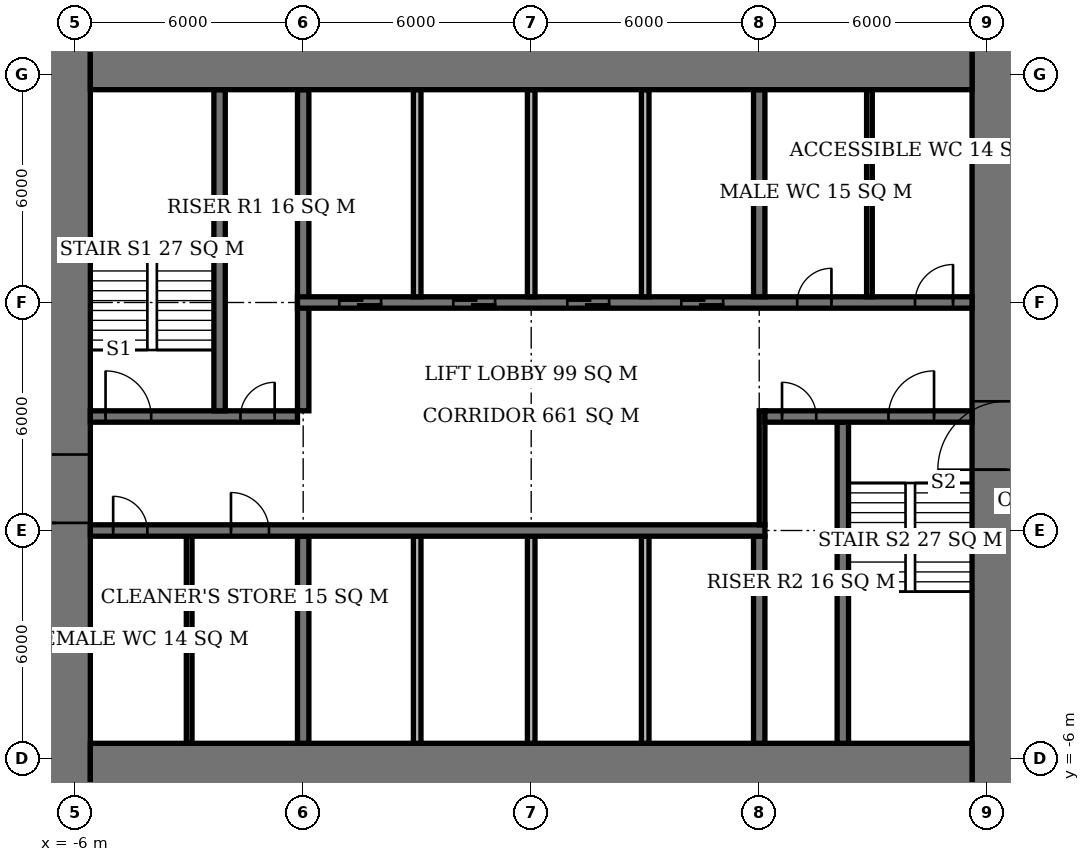
"""IFC4 building model, lengths in metres.
Left out: names, types, materials, properties, quantities, classifications, styles, units other than length and angle.
Written with IfcOpenShell. Run it as: python <this file> out.ifc"""

import sys

from ifc_helpers import new_model, si_unit, direction, frame, frame_2d, origin, place, context, subcontext, project, spatial, rectangle, extrude, element, fill, save


model = new_model("IFC4")
c1 = context("Model", 3, precision=1e-05, world=origin(), true_north=direction((0.0, 1.0)))
c2 = subcontext(c1, "Body", "Model", "MODEL_VIEW")
j1 = project(units=[si_unit("LENGTHUNIT", "METRE"), si_unit("PLANEANGLEUNIT", "RADIAN")], contexts=[c1])
p1 = place(None, origin())
s1 = spatial("IfcSite", under=j1, at=p1, CompositionType="ELEMENT")
p2 = place(p1, origin())
s2 = spatial("IfcBuilding", under=s1, at=p2, CompositionType="ELEMENT")
p3 = place(p2, frame((0.0, 0.0, 84.5)))
s3 = spatial("IfcBuildingStorey", under=s2, at=p3, CompositionType="ELEMENT", Elevation=84.5)
for number, where, z_axis, x_axis in (
    (1, (-5.6, -6.6, 0.0), (0.0, 0.0, 1.0), (1.0, 0.0, 0.0)),
    (2, (-5.6, 12.6, 0.0), (0.0, 0.0, 1.0), (1.0, 0.0, 0.0)),
):
    element("IfcWall", number, at=place(p3, frame(where, z_axis=z_axis, x_axis=x_axis)), inside=s3, PredefinedType="SHEAR", context=c2, shape_type="SweptSolid", body=[
        extrude(rectangle(XDim=23.2, YDim=2.0, at=frame_2d((11.6, 0.0))), origin(), (0.0, 0.0, 1.0), 3.9),
    ])
p4 = place(p3, frame((-6.5, -7.6, 0.0), z_axis=(0.0, 0.0, 1.0), x_axis=(0.0, 1.0, 0.0)))
e3 = element("IfcWall", 3, at=p4, inside=s3, PredefinedType="SHEAR", context=c2, shape_type="SweptSolid", body=[
    extrude(rectangle(XDim=21.2, YDim=1.8, at=frame_2d((10.6, 0.0))), origin(), (0.0, 0.0, 1.0), 3.9),
])
p5 = place(p4, frame((7.8, 0.0, 0.0)))
e4 = element("IfcOpeningElement", 4, at=p5, cuts=e3, PredefinedType="OPENING", context=c2, shape_type="SweptSolid", body=[
    extrude(rectangle(XDim=1.8, YDim=2.4, at=frame_2d((0.9, 1.2))), frame((0.0, 0.91, 0.0), z_axis=(0.0, -1.0, 0.0), x_axis=(1.0, 0.0, 0.0)), (0.0, 0.0, 1.0), 1.82),
])
p6 = place(p3, frame((18.5, -7.6, 0.0), z_axis=(0.0, 0.0, 1.0), x_axis=(0.0, 1.0, 0.0)))
e5 = element("IfcWall", 5, at=p6, inside=s3, PredefinedType="SHEAR", context=c2, shape_type="SweptSolid", body=[
    extrude(rectangle(XDim=21.2, YDim=1.8, at=frame_2d((10.6, 0.0))), origin(), (0.0, 0.0, 1.0), 3.9),
])
p7 = place(p6, frame((9.2, 0.0, 0.0)))
e6 = element("IfcOpeningElement", 6, at=p7, cuts=e5, PredefinedType="OPENING", context=c2, shape_type="SweptSolid", body=[
    extrude(rectangle(XDim=1.8, YDim=2.4, at=frame_2d((0.9, 1.2))), frame((0.0, 0.91, 0.0), z_axis=(0.0, -1.0, 0.0), x_axis=(1.0, 0.0, 0.0)), (0.0, 0.0, 1.0), 1.82),
])
p8 = place(p3, frame((-5.6, 0.0, 0.0), z_axis=(0.0, 0.0, 1.0), x_axis=(1.0, 0.0, 0.0)))
e7 = element("IfcWall", 7, at=p8, inside=s3, PredefinedType="SHEAR", context=c2, shape_type="SweptSolid", body=[
    extrude(rectangle(XDim=17.75, YDim=0.3, at=frame_2d((8.875, 0.0))), origin(), (0.0, 0.0, 1.0), 3.9),
])
p9 = place(p8, frame((0.6, 0.0, 0.0)))
e8 = element("IfcOpeningElement", 8, at=p9, cuts=e7, PredefinedType="OPENING", context=c2, shape_type="SweptSolid", body=[
    extrude(rectangle(XDim=0.9, YDim=2.1, at=frame_2d((0.45, 1.05))), frame((0.0, 0.16, 0.0), z_axis=(0.0, -1.0, 0.0), x_axis=(1.0, 0.0, 0.0)), (0.0, 0.0, 1.0), 0.32),
])
p10 = place(p8, frame((3.7, 0.0, 0.0)))
e9 = element("IfcOpeningElement", 9, at=p10, cuts=e7, PredefinedType="OPENING", context=c2, shape_type="SweptSolid", body=[
    extrude(rectangle(XDim=1.0, YDim=2.1, at=frame_2d((0.5, 1.05))), frame((0.0, 0.16, 0.0), z_axis=(0.0, -1.0, 0.0), x_axis=(1.0, 0.0, 0.0)), (0.0, 0.0, 1.0), 0.32),
])
p11 = place(p3, frame((-5.6, 3.0, 0.0), z_axis=(0.0, 0.0, 1.0), x_axis=(1.0, 0.0, 0.0)))
e10 = element("IfcWall", 10, at=p11, inside=s3, PredefinedType="SHEAR", context=c2, shape_type="SweptSolid", body=[
    extrude(rectangle(XDim=5.45, YDim=0.3, at=frame_2d((2.725, 0.0))), origin(), (0.0, 0.0, 1.0), 3.9),
])
p12 = place(p11, frame((0.4, 0.0, 0.0)))
e11 = element("IfcOpeningElement", 11, at=p12, cuts=e10, PredefinedType="OPENING", context=c2, shape_type="SweptSolid", body=[
    extrude(rectangle(XDim=1.2, YDim=2.1, at=frame_2d((0.6, 1.05))), frame((0.0, 0.16, 0.0), z_axis=(0.0, -1.0, 0.0), x_axis=(1.0, 0.0, 0.0)), (0.0, 0.0, 1.0), 0.32),
])
p13 = place(p11, frame((3.95, 0.0, 0.0)))
e12 = element("IfcOpeningElement", 12, at=p13, cuts=e10, PredefinedType="OPENING", context=c2, shape_type="SweptSolid", body=[
    extrude(rectangle(XDim=0.9, YDim=2.1, at=frame_2d((0.45, 1.05))), frame((0.0, 0.16, 0.0), z_axis=(0.0, -1.0, 0.0), x_axis=(1.0, 0.0, 0.0)), (0.0, 0.0, 1.0), 0.32),
])
p14 = place(p3, frame((12.15, 3.0, 0.0), z_axis=(0.0, 0.0, 1.0), x_axis=(1.0, 0.0, 0.0)))
e13 = element("IfcWall", 13, at=p14, inside=s3, PredefinedType="SHEAR", context=c2, shape_type="SweptSolid", body=[
    extrude(rectangle(XDim=5.45, YDim=0.3, at=frame_2d((2.725, 0.0))), origin(), (0.0, 0.0, 1.0), 3.9),
])
p15 = place(p14, frame((3.25, 0.0, 0.0)))
e14 = element("IfcOpeningElement", 14, at=p15, cuts=e13, PredefinedType="OPENING", context=c2, shape_type="SweptSolid", body=[
    extrude(rectangle(XDim=1.2, YDim=2.1, at=frame_2d((0.6, 1.05))), frame((0.0, 0.16, 0.0), z_axis=(0.0, -1.0, 0.0), x_axis=(1.0, 0.0, 0.0)), (0.0, 0.0, 1.0), 0.32),
])
p16 = place(p14, frame((0.45, 0.0, 0.0)))
e15 = element("IfcOpeningElement", 15, at=p16, cuts=e13, PredefinedType="OPENING", context=c2, shape_type="SweptSolid", body=[
    extrude(rectangle(XDim=0.9, YDim=2.1, at=frame_2d((0.45, 1.05))), frame((0.0, 0.16, 0.0), z_axis=(0.0, -1.0, 0.0), x_axis=(1.0, 0.0, 0.0)), (0.0, 0.0, 1.0), 0.32),
])
p17 = place(p3, frame((-0.15, 6.0, 0.0), z_axis=(0.0, 0.0, 1.0), x_axis=(1.0, 0.0, 0.0)))
e16 = element("IfcWall", 16, at=p17, inside=s3, PredefinedType="SHEAR", context=c2, shape_type="SweptSolid", body=[
    extrude(rectangle(XDim=17.75, YDim=0.3, at=frame_2d((8.875, 0.0))), origin(), (0.0, 0.0, 1.0), 3.9),
])
p18 = place(p17, frame((13.15, 0.0, 0.0)))
e17 = element("IfcOpeningElement", 17, at=p18, cuts=e16, PredefinedType="OPENING", context=c2, shape_type="SweptSolid", body=[
    extrude(rectangle(XDim=0.9, YDim=2.1, at=frame_2d((0.45, 1.05))), frame((0.0, 0.16, 0.0), z_axis=(0.0, -1.0, 0.0), x_axis=(1.0, 0.0, 0.0)), (0.0, 0.0, 1.0), 0.32),
])
p19 = place(p17, frame((16.25, 0.0, 0.0)))
e18 = element("IfcOpeningElement", 18, at=p19, cuts=e16, PredefinedType="OPENING", context=c2, shape_type="SweptSolid", body=[
    extrude(rectangle(XDim=1.0, YDim=2.1, at=frame_2d((0.5, 1.05))), frame((0.0, 0.16, 0.0), z_axis=(0.0, -1.0, 0.0), x_axis=(1.0, 0.0, 0.0)), (0.0, 0.0, 1.0), 0.32),
])
p20 = place(p17, frame((1.1, 0.0, 0.0)))
e19 = element("IfcOpeningElement", 19, at=p20, cuts=e16, PredefinedType="OPENING", context=c2, shape_type="SweptSolid", body=[
    extrude(rectangle(XDim=1.1, YDim=2.1, at=frame_2d((0.55, 1.05))), frame((0.0, 0.16, 0.0), z_axis=(0.0, -1.0, 0.0), x_axis=(1.0, 0.0, 0.0)), (0.0, 0.0, 1.0), 0.32),
])
p21 = place(p17, frame((4.1, 0.0, 0.0)))
e20 = element("IfcOpeningElement", 20, at=p21, cuts=e16, PredefinedType="OPENING", context=c2, shape_type="SweptSolid", body=[
    extrude(rectangle(XDim=1.1, YDim=2.1, at=frame_2d((0.55, 1.05))), frame((0.0, 0.16, 0.0), z_axis=(0.0, -1.0, 0.0), x_axis=(1.0, 0.0, 0.0)), (0.0, 0.0, 1.0), 0.32),
])
p22 = place(p17, frame((7.1, 0.0, 0.0)))
e21 = element("IfcOpeningElement", 21, at=p22, cuts=e16, PredefinedType="OPENING", context=c2, shape_type="SweptSolid", body=[
    extrude(rectangle(XDim=1.1, YDim=2.1, at=frame_2d((0.55, 1.05))), frame((0.0, 0.16, 0.0), z_axis=(0.0, -1.0, 0.0), x_axis=(1.0, 0.0, 0.0)), (0.0, 0.0, 1.0), 0.32),
])
p23 = place(p17, frame((10.1, 0.0, 0.0)))
e22 = element("IfcOpeningElement", 22, at=p23, cuts=e16, PredefinedType="OPENING", context=c2, shape_type="SweptSolid", body=[
    extrude(rectangle(XDim=1.1, YDim=2.1, at=frame_2d((0.55, 1.05))), frame((0.0, 0.16, 0.0), z_axis=(0.0, -1.0, 0.0), x_axis=(1.0, 0.0, 0.0)), (0.0, 0.0, 1.0), 0.32),
])
p24 = place(p3, frame((0.0, -5.6, 0.0), z_axis=(0.0, 0.0, 1.0), x_axis=(0.0, 1.0, 0.0)))
e23 = element("IfcWall", 23, at=p24, inside=s3, PredefinedType="SHEAR", context=c2, shape_type="SweptSolid", body=[
    extrude(rectangle(XDim=5.45, YDim=0.3, at=frame_2d((2.725, 0.0))), origin(), (0.0, 0.0, 1.0), 3.9),
])
p25 = place(p3, frame((0.0, 3.15, 0.0), z_axis=(0.0, 0.0, 1.0), x_axis=(0.0, 1.0, 0.0)))
e24 = element("IfcWall", 24, at=p25, inside=s3, PredefinedType="SHEAR", context=c2, shape_type="SweptSolid", body=[
    extrude(rectangle(XDim=8.45, YDim=0.3, at=frame_2d((4.225, 0.0))), origin(), (0.0, 0.0, 1.0), 3.9),
])
for number, where, z_axis, x_axis in (
    (25, (12.0, -5.6, 0.0), (0.0, 0.0, 1.0), (0.0, 1.0, 0.0)),
    (26, (12.0, 6.15, 0.0), (0.0, 0.0, 1.0), (0.0, 1.0, 0.0)),
):
    element("IfcWall", number, at=place(p3, frame(where, z_axis=z_axis, x_axis=x_axis)), inside=s3, PredefinedType="SHEAR", context=c2, shape_type="SweptSolid", body=[
        extrude(rectangle(XDim=5.45, YDim=0.3, at=frame_2d((2.725, 0.0))), origin(), (0.0, 0.0, 1.0), 3.9),
    ])
for number, where, z_axis, x_axis in (
    (27, (-2.2, 3.15, 0.0), (0.0, 0.0, 1.0), (0.0, 1.0, 0.0)),
    (28, (14.2, -5.6, 0.0), (0.0, 0.0, 1.0), (0.0, 1.0, 0.0)),
):
    element("IfcWall", number, at=place(p3, frame(where, z_axis=z_axis, x_axis=x_axis)), inside=s3, PredefinedType="SHEAR", context=c2, shape_type="SweptSolid", body=[
        extrude(rectangle(XDim=8.45, YDim=0.3, at=frame_2d((4.225, 0.0))), origin(), (0.0, 0.0, 1.0), 3.9),
    ])
for number, where, z_axis, x_axis in (
    (29, (3.0, 6.15, 0.0), (0.0, 0.0, 1.0), (0.0, 1.0, 0.0)),
    (30, (6.0, 6.15, 0.0), (0.0, 0.0, 1.0), (0.0, 1.0, 0.0)),
    (31, (9.0, 6.15, 0.0), (0.0, 0.0, 1.0), (0.0, 1.0, 0.0)),
    (32, (3.0, -5.6, 0.0), (0.0, 0.0, 1.0), (0.0, 1.0, 0.0)),
    (33, (6.0, -5.6, 0.0), (0.0, 0.0, 1.0), (0.0, 1.0, 0.0)),
    (34, (9.0, -5.6, 0.0), (0.0, 0.0, 1.0), (0.0, 1.0, 0.0)),
):
    element("IfcWall", number, at=place(p3, frame(where, z_axis=z_axis, x_axis=x_axis)), inside=s3, PredefinedType="SOLIDWALL", context=c2, shape_type="SweptSolid", body=[
        extrude(rectangle(XDim=5.45, YDim=0.2, at=frame_2d((2.725, 0.0))), origin(), (0.0, 0.0, 1.0), 3.9),
    ])
for number, where, z_axis, x_axis in (
    (35, (-3.0, -5.6, 0.0), (0.0, 0.0, 1.0), (0.0, 1.0, 0.0)),
    (36, (14.9, 6.15, 0.0), (0.0, 0.0, 1.0), (0.0, 1.0, 0.0)),
):
    element("IfcWall", number, at=place(p3, frame(where, z_axis=z_axis, x_axis=x_axis)), inside=s3, PredefinedType="PLUMBINGWALL", context=c2, shape_type="SweptSolid", body=[
        extrude(rectangle(XDim=5.45, YDim=0.15, at=frame_2d((2.725, 0.0))), origin(), (0.0, 0.0, 1.0), 3.65),
    ])
p26 = place(p3, frame((12.075, 0.15, 0.0), z_axis=(0.0, 0.0, 1.0), x_axis=(0.0, 1.0, 0.0)))
e37 = element("IfcWall", 37, at=p26, inside=s3, PredefinedType="PARTITIONING", context=c2, shape_type="SweptSolid", body=[
    extrude(rectangle(XDim=3.0, YDim=0.15, at=frame_2d((1.5, 0.0))), origin(), (0.0, 0.0, 1.0), 3.65),
])
p27 = place(p5, origin())
e38 = element("IfcDoor", 38, at=p27, inside=s3, OperationType="DOUBLE_DOOR_SINGLE_SWING", PredefinedType="DOOR", context=c2, shape_type="SweptSolid", body=[
    extrude(rectangle(XDim=1.8, YDim=2.4, at=frame_2d((0.9, 1.2))), frame((0.0, 0.025, 0.0), z_axis=(0.0, -1.0, 0.0), x_axis=(1.0, 0.0, 0.0)), (0.0, 0.0, 1.0), 0.05),
])
fill(e4, e38)
p28 = place(p7, origin())
e39 = element("IfcDoor", 39, at=p28, inside=s3, OperationType="DOUBLE_DOOR_SINGLE_SWING", PredefinedType="DOOR", context=c2, shape_type="SweptSolid", body=[
    extrude(rectangle(XDim=1.8, YDim=2.4, at=frame_2d((0.9, 1.2))), frame((0.0, 0.025, 0.0), z_axis=(0.0, -1.0, 0.0), x_axis=(1.0, 0.0, 0.0)), (0.0, 0.0, 1.0), 0.05),
])
fill(e6, e39)
p29 = place(p12, origin())
e40 = element("IfcDoor", 40, at=p29, inside=s3, OperationType="SINGLE_SWING_LEFT", PredefinedType="DOOR", context=c2, shape_type="SweptSolid", body=[
    extrude(rectangle(XDim=1.2, YDim=2.1, at=frame_2d((0.6, 1.05))), frame((0.0, 0.025, 0.0), z_axis=(0.0, -1.0, 0.0), x_axis=(1.0, 0.0, 0.0)), (0.0, 0.0, 1.0), 0.05),
])
fill(e11, e40)
p30 = place(p13, origin())
e41 = element("IfcDoor", 41, at=p30, inside=s3, OperationType="SINGLE_SWING_RIGHT", PredefinedType="DOOR", context=c2, shape_type="SweptSolid", body=[
    extrude(rectangle(XDim=0.9, YDim=2.1, at=frame_2d((0.45, 1.05))), frame((0.0, 0.025, 0.0), z_axis=(0.0, -1.0, 0.0), x_axis=(1.0, 0.0, 0.0)), (0.0, 0.0, 1.0), 0.05),
])
fill(e12, e41)
p31 = place(p15, origin())
e42 = element("IfcDoor", 42, at=p31, inside=s3, OperationType="SINGLE_SWING_RIGHT", PredefinedType="DOOR", context=c2, shape_type="SweptSolid", body=[
    extrude(rectangle(XDim=1.2, YDim=2.1, at=frame_2d((0.6, 1.05))), frame((0.0, 0.025, 0.0), z_axis=(0.0, -1.0, 0.0), x_axis=(1.0, 0.0, 0.0)), (0.0, 0.0, 1.0), 0.05),
])
fill(e14, e42)
p32 = place(p16, origin())
e43 = element("IfcDoor", 43, at=p32, inside=s3, OperationType="SINGLE_SWING_LEFT", PredefinedType="DOOR", context=c2, shape_type="SweptSolid", body=[
    extrude(rectangle(XDim=0.9, YDim=2.1, at=frame_2d((0.45, 1.05))), frame((0.0, 0.025, 0.0), z_axis=(0.0, -1.0, 0.0), x_axis=(1.0, 0.0, 0.0)), (0.0, 0.0, 1.0), 0.05),
])
fill(e15, e43)
p33 = place(p9, origin())
e44 = element("IfcDoor", 44, at=p33, inside=s3, OperationType="SINGLE_SWING_LEFT", PredefinedType="DOOR", context=c2, shape_type="SweptSolid", body=[
    extrude(rectangle(XDim=0.9, YDim=2.1, at=frame_2d((0.45, 1.05))), frame((0.0, 0.025, 0.0), z_axis=(0.0, -1.0, 0.0), x_axis=(1.0, 0.0, 0.0)), (0.0, 0.0, 1.0), 0.05),
])
fill(e8, e44)
p34 = place(p10, origin())
e45 = element("IfcDoor", 45, at=p34, inside=s3, OperationType="SINGLE_SWING_LEFT", PredefinedType="DOOR", context=c2, shape_type="SweptSolid", body=[
    extrude(rectangle(XDim=1.0, YDim=2.1, at=frame_2d((0.5, 1.05))), frame((0.0, 0.025, 0.0), z_axis=(0.0, -1.0, 0.0), x_axis=(1.0, 0.0, 0.0)), (0.0, 0.0, 1.0), 0.05),
])
fill(e9, e45)
p35 = place(p18, origin())
e46 = element("IfcDoor", 46, at=p35, inside=s3, OperationType="SINGLE_SWING_RIGHT", PredefinedType="DOOR", context=c2, shape_type="SweptSolid", body=[
    extrude(rectangle(XDim=0.9, YDim=2.1, at=frame_2d((0.45, 1.05))), frame((0.0, 0.025, 0.0), z_axis=(0.0, -1.0, 0.0), x_axis=(1.0, 0.0, 0.0)), (0.0, 0.0, 1.0), 0.05),
])
fill(e17, e46)
p36 = place(p19, origin())
e47 = element("IfcDoor", 47, at=p36, inside=s3, OperationType="SINGLE_SWING_RIGHT", PredefinedType="DOOR", context=c2, shape_type="SweptSolid", body=[
    extrude(rectangle(XDim=1.0, YDim=2.1, at=frame_2d((0.5, 1.05))), frame((0.0, 0.025, 0.0), z_axis=(0.0, -1.0, 0.0), x_axis=(1.0, 0.0, 0.0)), (0.0, 0.0, 1.0), 0.05),
])
fill(e18, e47)
p37 = place(p20, origin())
e48 = element("IfcDoor", 48, at=p37, inside=s3, OperationType="DOUBLE_DOOR_SLIDING", PredefinedType="USERDEFINED", context=c2, shape_type="SweptSolid", body=[
    extrude(rectangle(XDim=1.1, YDim=2.1, at=frame_2d((0.55, 1.05))), frame((0.0, 0.025, 0.0), z_axis=(0.0, -1.0, 0.0), x_axis=(1.0, 0.0, 0.0)), (0.0, 0.0, 1.0), 0.05),
])
fill(e19, e48)
p38 = place(p21, origin())
e49 = element("IfcDoor", 49, at=p38, inside=s3, OperationType="DOUBLE_DOOR_SLIDING", PredefinedType="USERDEFINED", context=c2, shape_type="SweptSolid", body=[
    extrude(rectangle(XDim=1.1, YDim=2.1, at=frame_2d((0.55, 1.05))), frame((0.0, 0.025, 0.0), z_axis=(0.0, -1.0, 0.0), x_axis=(1.0, 0.0, 0.0)), (0.0, 0.0, 1.0), 0.05),
])
fill(e20, e49)
p39 = place(p22, origin())
e50 = element("IfcDoor", 50, at=p39, inside=s3, OperationType="DOUBLE_DOOR_SLIDING", PredefinedType="USERDEFINED", context=c2, shape_type="SweptSolid", body=[
    extrude(rectangle(XDim=1.1, YDim=2.1, at=frame_2d((0.55, 1.05))), frame((0.0, 0.025, 0.0), z_axis=(0.0, -1.0, 0.0), x_axis=(1.0, 0.0, 0.0)), (0.0, 0.0, 1.0), 0.05),
])
fill(e21, e50)
p40 = place(p23, origin())
e51 = element("IfcDoor", 51, at=p40, inside=s3, OperationType="DOUBLE_DOOR_SLIDING", PredefinedType="USERDEFINED", context=c2, shape_type="SweptSolid", body=[
    extrude(rectangle(XDim=1.1, YDim=2.1, at=frame_2d((0.55, 1.05))), frame((0.0, 0.025, 0.0), z_axis=(0.0, -1.0, 0.0), x_axis=(1.0, 0.0, 0.0)), (0.0, 0.0, 1.0), 0.05),
])
fill(e22, e51)
save(model, sys.argv[1])
